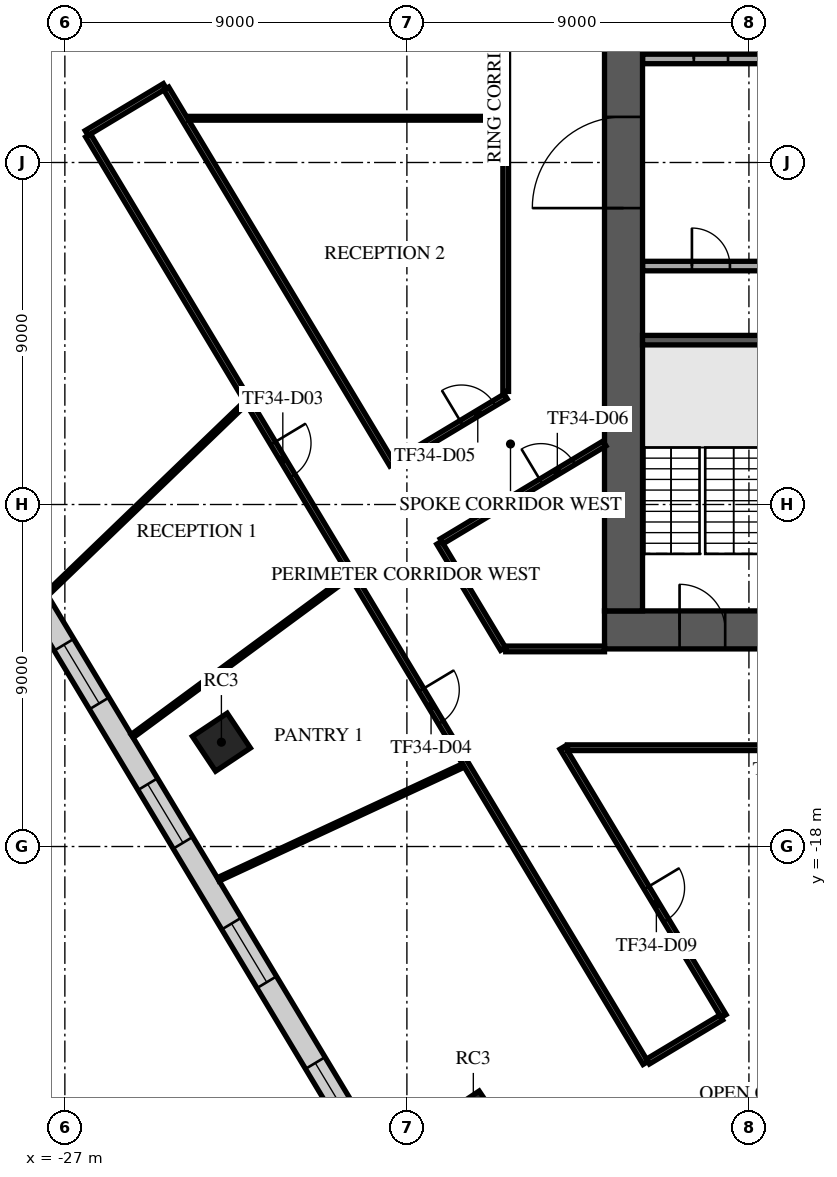
"""IFC4 building model, lengths in metres.
Left out: names, types, materials, properties, quantities, classifications, styles, units other than length and angle.
Written with IfcOpenShell. Run it as: python <this file> out.ifc"""

import sys

from ifc_helpers import new_model, si_unit, direction, frame, frame_2d, origin, origin_2d, place, context, subcontext, project, spatial, rectangle, extrude, element, fill, save


model = new_model("IFC4")
c1 = context("Model", 3, precision=1e-05, world=origin(), true_north=direction((0.0, 1.0)))
c2 = subcontext(c1, "Body", "Model", "MODEL_VIEW")
j1 = project(units=[si_unit("LENGTHUNIT", "METRE"), si_unit("PLANEANGLEUNIT", "RADIAN")], contexts=[c1])
p1 = place(None, origin())
s1 = spatial("IfcSite", under=j1, at=p1, CompositionType="ELEMENT")
p2 = place(p1, origin())
s2 = spatial("IfcBuilding", under=s1, at=p2, CompositionType="ELEMENT")
p3 = place(p2, frame((0.0, 0.0, 147.7)))
s3 = spatial("IfcBuildingStorey", under=s2, at=p3, CompositionType="ELEMENT", Elevation=147.7)
for number, where, z_axis, x_axis in (
    (1, (-22.881, -15.255, 0.0), (0.0, 0.0, 1.0), (0.832, 0.555, 0.0)),
    (2, (-16.252, -25.198, 0.0), (0.0, 0.0, 1.0), (0.832, 0.555, 0.0)),
):
    element("IfcColumn", number, at=place(p3, frame(where, z_axis=z_axis, x_axis=x_axis)), inside=s3, PredefinedType="COLUMN", context=c2, shape_type="SweptSolid", body=[
        extrude(rectangle(XDim=1.1, YDim=1.1, at=origin_2d()), origin(), (0.0, 0.0, 1.0), 4.0),
    ])
p4 = place(p3, frame((-12.8, -12.3, 0.0), z_axis=(0.0, 0.0, 1.0), x_axis=(1.0, 0.0, 0.0)))
e3 = element("IfcWall", 3, at=p4, inside=s3, PredefinedType="SHEAR", context=c2, shape_type="SweptSolid", body=[
    extrude(rectangle(XDim=25.6, YDim=1.0, at=frame_2d((12.8, 0.0))), origin(), (0.0, 0.0, 1.0), 3.6),
])
p5 = place(p4, frame((7.7, 0.0, 0.0)))
e4 = element("IfcOpeningElement", 4, at=p5, cuts=e3, PredefinedType="OPENING", context=c2, shape_type="SweptSolid", body=[
    extrude(rectangle(XDim=2.0, YDim=2.1, at=frame_2d((1.0, 1.05))), frame((0.0, 0.51, 0.0), z_axis=(0.0, -1.0, 0.0), x_axis=(1.0, 0.0, 0.0)), (0.0, 0.0, 1.0), 1.02),
])
p6 = place(p4, frame((17.825, 0.0, 0.0)))
e5 = element("IfcOpeningElement", 5, at=p6, cuts=e3, PredefinedType="OPENING", context=c2, shape_type="SweptSolid", body=[
    extrude(rectangle(XDim=1.2, YDim=2.1, at=frame_2d((0.6, 1.05))), frame((0.0, 0.51, 0.0), z_axis=(0.0, -1.0, 0.0), x_axis=(1.0, 0.0, 0.0)), (0.0, 0.0, 1.0), 1.02),
])
p7 = place(p4, frame((1.975, 0.0, 0.0)))
e6 = element("IfcOpeningElement", 6, at=p7, cuts=e3, PredefinedType="OPENING", context=c2, shape_type="SweptSolid", body=[
    extrude(rectangle(XDim=1.2, YDim=2.1, at=frame_2d((0.6, 1.05))), frame((0.0, 0.51, 0.0), z_axis=(0.0, -1.0, 0.0), x_axis=(1.0, 0.0, 0.0)), (0.0, 0.0, 1.0), 1.02),
])
p8 = place(p4, frame((22.425, 0.0, 0.0)))
e7 = element("IfcOpeningElement", 7, at=p8, cuts=e3, PredefinedType="OPENING", context=c2, shape_type="SweptSolid", body=[
    extrude(rectangle(XDim=1.2, YDim=2.1, at=frame_2d((0.6, 1.05))), frame((0.0, 0.51, 0.0), z_axis=(0.0, -1.0, 0.0), x_axis=(1.0, 0.0, 0.0)), (0.0, 0.0, 1.0), 1.02),
])
p9 = place(p3, frame((-12.3, -11.8, 0.0), z_axis=(0.0, 0.0, 1.0), x_axis=(0.0, 1.0, 0.0)))
e8 = element("IfcWall", 8, at=p9, inside=s3, PredefinedType="SHEAR", context=c2, shape_type="SweptSolid", body=[
    extrude(rectangle(XDim=23.6, YDim=1.0, at=frame_2d((11.8, 0.0))), origin(), (0.0, 0.0, 1.0), 3.6),
])
p10 = place(p9, frame((10.6, 0.0, 0.0)))
e9 = element("IfcOpeningElement", 9, at=p10, cuts=e8, PredefinedType="OPENING", context=c2, shape_type="SweptSolid", body=[
    extrude(rectangle(XDim=2.4, YDim=2.4, at=frame_2d((1.2, 1.2))), frame((0.0, 0.51, 0.0), z_axis=(0.0, -1.0, 0.0), x_axis=(1.0, 0.0, 0.0)), (0.0, 0.0, 1.0), 1.02),
])
p11 = place(p3, frame((-8.65, -4.675, 0.0), z_axis=(0.0, 0.0, 1.0), x_axis=(-1.0, 0.0, 0.0)))
e10 = element("IfcWall", 10, at=p11, inside=s3, PredefinedType="SOLIDWALL", context=c2, shape_type="SweptSolid", body=[
    extrude(rectangle(XDim=3.15, YDim=0.25, at=frame_2d((1.575, 0.0))), origin(), (0.0, 0.0, 1.0), 3.6),
])
p12 = place(p3, frame((-11.795, -2.725, 0.0), z_axis=(0.0, 0.0, 1.0), x_axis=(1.0, 0.0, 0.0)))
e11 = element("IfcWall", 11, at=p12, inside=s3, PredefinedType="PARTITIONING", context=c2, shape_type="SweptSolid", body=[
    extrude(rectangle(XDim=8.915, YDim=0.25, at=frame_2d((4.458, 0.0))), origin(), (0.0, 0.0, 1.0), 3.6),
])
p13 = place(p12, frame((1.295, 0.0, 0.0)))
e12 = element("IfcOpeningElement", 12, at=p13, cuts=e11, PredefinedType="OPENING", context=c2, shape_type="SweptSolid", body=[
    extrude(rectangle(XDim=1.0, YDim=2.1, at=frame_2d((0.5, 1.05))), frame((0.0, 0.135, 0.0), z_axis=(0.0, -1.0, 0.0), x_axis=(1.0, 0.0, 0.0)), (0.0, 0.0, 1.0), 0.27),
])
p14 = place(p12, frame((4.42, 0.0, 0.0)))
e13 = element("IfcOpeningElement", 13, at=p14, cuts=e11, PredefinedType="OPENING", context=c2, shape_type="SweptSolid", body=[
    extrude(rectangle(XDim=1.0, YDim=2.1, at=frame_2d((0.5, 1.05))), frame((0.0, 0.135, 0.0), z_axis=(0.0, -1.0, 0.0), x_axis=(1.0, 0.0, 0.0)), (0.0, 0.0, 1.0), 0.27),
])
p15 = place(p3, frame((-11.795, 2.725, 0.0), z_axis=(0.0, 0.0, 1.0), x_axis=(1.0, 0.0, 0.0)))
e14 = element("IfcWall", 14, at=p15, inside=s3, PredefinedType="PARTITIONING", context=c2, shape_type="SweptSolid", body=[
    extrude(rectangle(XDim=3.415, YDim=0.25, at=frame_2d((1.708, 0.0))), origin(), (0.0, 0.0, 1.0), 3.6),
])
p16 = place(p15, frame((1.345, 0.0, 0.0)))
e15 = element("IfcOpeningElement", 15, at=p16, cuts=e14, PredefinedType="OPENING", context=c2, shape_type="SweptSolid", body=[
    extrude(rectangle(XDim=0.9, YDim=2.1, at=frame_2d((0.45, 1.05))), frame((0.0, 0.135, 0.0), z_axis=(0.0, -1.0, 0.0), x_axis=(1.0, 0.0, 0.0)), (0.0, 0.0, 1.0), 0.27),
])
p17 = place(p3, frame((-36.416, 2.94, 0.0), z_axis=(0.0, 0.0, 1.0), x_axis=(0.515041561016, -0.857165206029, 0.0)))
e16 = element("IfcWall", 16, at=p17, inside=s3, PredefinedType="STANDARD", context=c2, shape_type="SweptSolid", body=[
    extrude(rectangle(XDim=42.552, YDim=0.6, at=frame_2d((21.276, 0.0))), origin(), (0.0, 0.0, 1.0), 3.6),
])
p18 = place(p17, frame((1.178, 0.0, 0.9)))
e17 = element("IfcOpeningElement", 17, at=p18, cuts=e16, PredefinedType="OPENING", context=c2, shape_type="SweptSolid", body=[
    extrude(rectangle(XDim=1.8, YDim=2.1, at=frame_2d((0.9, 1.05))), frame((0.0, 0.31, 0.0), z_axis=(0.0, -1.0, 0.0), x_axis=(1.0, 0.0, 0.0)), (0.0, 0.0, 1.0), 0.62),
])
p19 = place(p17, frame((5.396, 0.0, 0.9)))
e18 = element("IfcOpeningElement", 18, at=p19, cuts=e16, PredefinedType="OPENING", context=c2, shape_type="SweptSolid", body=[
    extrude(rectangle(XDim=1.8, YDim=2.1, at=frame_2d((0.9, 1.05))), frame((0.0, 0.31, 0.0), z_axis=(0.0, -1.0, 0.0), x_axis=(1.0, 0.0, 0.0)), (0.0, 0.0, 1.0), 0.62),
])
p20 = place(p17, frame((9.676, 0.0, 0.9)))
e19 = element("IfcOpeningElement", 19, at=p20, cuts=e16, PredefinedType="OPENING", context=c2, shape_type="SweptSolid", body=[
    extrude(rectangle(XDim=1.8, YDim=2.1, at=frame_2d((0.9, 1.05))), frame((0.0, 0.31, 0.0), z_axis=(0.0, -1.0, 0.0), x_axis=(1.0, 0.0, 0.0)), (0.0, 0.0, 1.0), 0.62),
])
p21 = place(p17, frame((13.956, 0.0, 0.9)))
e20 = element("IfcOpeningElement", 20, at=p21, cuts=e16, PredefinedType="OPENING", context=c2, shape_type="SweptSolid", body=[
    extrude(rectangle(XDim=1.8, YDim=2.1, at=frame_2d((0.9, 1.05))), frame((0.0, 0.31, 0.0), z_axis=(0.0, -1.0, 0.0), x_axis=(1.0, 0.0, 0.0)), (0.0, 0.0, 1.0), 0.62),
])
p22 = place(p17, frame((18.236, 0.0, 0.9)))
e21 = element("IfcOpeningElement", 21, at=p22, cuts=e16, PredefinedType="OPENING", context=c2, shape_type="SweptSolid", body=[
    extrude(rectangle(XDim=1.8, YDim=2.1, at=frame_2d((0.9, 1.05))), frame((0.0, 0.31, 0.0), z_axis=(0.0, -1.0, 0.0), x_axis=(1.0, 0.0, 0.0)), (0.0, 0.0, 1.0), 0.62),
])
p23 = place(p17, frame((22.516, 0.0, 0.9)))
e22 = element("IfcOpeningElement", 22, at=p23, cuts=e16, PredefinedType="OPENING", context=c2, shape_type="SweptSolid", body=[
    extrude(rectangle(XDim=1.8, YDim=2.1, at=frame_2d((0.9, 1.05))), frame((0.0, 0.31, 0.0), z_axis=(0.0, -1.0, 0.0), x_axis=(1.0, 0.0, 0.0)), (0.0, 0.0, 1.0), 0.62),
])
p24 = place(p17, frame((26.796, 0.0, 0.9)))
e23 = element("IfcOpeningElement", 23, at=p24, cuts=e16, PredefinedType="OPENING", context=c2, shape_type="SweptSolid", body=[
    extrude(rectangle(XDim=1.8, YDim=2.1, at=frame_2d((0.9, 1.05))), frame((0.0, 0.31, 0.0), z_axis=(0.0, -1.0, 0.0), x_axis=(1.0, 0.0, 0.0)), (0.0, 0.0, 1.0), 0.62),
])
p25 = place(p17, frame((31.076, 0.0, 0.9)))
e24 = element("IfcOpeningElement", 24, at=p25, cuts=e16, PredefinedType="OPENING", context=c2, shape_type="SweptSolid", body=[
    extrude(rectangle(XDim=1.8, YDim=2.1, at=frame_2d((0.9, 1.05))), frame((0.0, 0.31, 0.0), z_axis=(0.0, -1.0, 0.0), x_axis=(1.0, 0.0, 0.0)), (0.0, 0.0, 1.0), 0.62),
])
p26 = place(p17, frame((35.356, 0.0, 0.9)))
e25 = element("IfcOpeningElement", 25, at=p26, cuts=e16, PredefinedType="OPENING", context=c2, shape_type="SweptSolid", body=[
    extrude(rectangle(XDim=1.8, YDim=2.1, at=frame_2d((0.9, 1.05))), frame((0.0, 0.31, 0.0), z_axis=(0.0, -1.0, 0.0), x_axis=(1.0, 0.0, 0.0)), (0.0, 0.0, 1.0), 0.62),
])
p27 = place(p17, frame((39.573, 0.0, 0.9)))
e26 = element("IfcOpeningElement", 26, at=p27, cuts=e16, PredefinedType="OPENING", context=c2, shape_type="SweptSolid", body=[
    extrude(rectangle(XDim=1.8, YDim=2.1, at=frame_2d((0.9, 1.05))), frame((0.0, 0.31, 0.0), z_axis=(0.0, -1.0, 0.0), x_axis=(1.0, 0.0, 0.0)), (0.0, 0.0, 1.0), 0.62),
])
p28 = place(p3, frame((-26.427, 0.775, 0.0), z_axis=(0.0, 0.0, 1.0), x_axis=(0.857133645358, 0.515094082664, 0.0)))
e27 = element("IfcWall", 27, at=p28, inside=s3, PredefinedType="PARTITIONING", context=c2, shape_type="SweptSolid", body=[
    extrude(rectangle(XDim=2.4, YDim=0.15, at=frame_2d((1.2, 0.0))), origin(), (0.0, 0.0, 1.0), 3.6),
])
p29 = place(p3, frame((-26.388, 0.711, 0.0), z_axis=(0.0, 0.0, 1.0), x_axis=(0.515060503771, -0.857153823684, 0.0)))
e28 = element("IfcWall", 28, at=p29, inside=s3, PredefinedType="PARTITIONING", context=c2, shape_type="SweptSolid", body=[
    extrude(rectangle(XDim=28.475, YDim=0.15, at=frame_2d((14.238, 0.0))), origin(), (0.0, 0.0, 1.0), 3.15),
])
p30 = place(p29, frame((9.447, 0.0, 0.0)))
e29 = element("IfcOpeningElement", 29, at=p30, cuts=e28, PredefinedType="OPENING", context=c2, shape_type="SweptSolid", body=[
    extrude(rectangle(XDim=1.0, YDim=2.1, at=frame_2d((0.5, 1.05))), frame((0.0, 0.085, 0.0), z_axis=(0.0, -1.0, 0.0), x_axis=(1.0, 0.0, 0.0)), (0.0, 0.0, 1.0), 0.17),
])
p31 = place(p29, frame((17.021, 0.0, 0.0)))
e30 = element("IfcOpeningElement", 30, at=p31, cuts=e28, PredefinedType="OPENING", context=c2, shape_type="SweptSolid", body=[
    extrude(rectangle(XDim=1.0, YDim=2.1, at=frame_2d((0.5, 1.05))), frame((0.0, 0.085, 0.0), z_axis=(0.0, -1.0, 0.0), x_axis=(1.0, 0.0, 0.0)), (0.0, 0.0, 1.0), 0.17),
])
p32 = place(p3, frame((-24.331, 1.947, 0.0), z_axis=(0.0, 0.0, 1.0), x_axis=(0.51502118809, -0.857177447101, 0.0)))
e31 = element("IfcWall", 31, at=p32, inside=s3, PredefinedType="PARTITIONING", context=c2, shape_type="SweptSolid", body=[
    extrude(rectangle(XDim=11.546, YDim=0.15, at=frame_2d((5.773, 0.0))), origin(), (0.0, 0.0, 1.0), 3.15),
])
p33 = place(p3, frame((-18.321, -7.911, 0.0), z_axis=(0.0, 0.0, 1.0), x_axis=(0.857126069009, 0.51510668975, 0.0)))
e32 = element("IfcWall", 32, at=p33, inside=s3, PredefinedType="PARTITIONING", context=c2, shape_type="SweptSolid", body=[
    extrude(rectangle(XDim=3.408, YDim=0.15, at=frame_2d((1.704, 0.0))), origin(), (0.0, 0.0, 1.0), 3.6),
])
p34 = place(p33, frame((2.05, 0.0, 0.0)))
e33 = element("IfcOpeningElement", 33, at=p34, cuts=e32, PredefinedType="OPENING", context=c2, shape_type="SweptSolid", body=[
    extrude(rectangle(XDim=1.0, YDim=2.1, at=frame_2d((0.5, 1.05))), frame((0.0, 0.085, 0.0), z_axis=(0.0, -1.0, 0.0), x_axis=(1.0, 0.0, 0.0)), (0.0, 0.0, 1.0), 0.17),
])
p35 = place(p3, frame((-17.149, -10.007, 0.0), z_axis=(0.0, 0.0, 1.0), x_axis=(0.515211704808, -0.857062949397, 0.0)))
e34 = element("IfcWall", 34, at=p35, inside=s3, PredefinedType="PARTITIONING", context=c2, shape_type="SweptSolid", body=[
    extrude(rectangle(XDim=3.259, YDim=0.15, at=frame_2d((1.629, 0.0))), origin(), (0.0, 0.0, 1.0), 3.15),
])
p36 = place(p3, frame((-17.085, -9.969, 0.0), z_axis=(0.0, 0.0, 1.0), x_axis=(0.857169540237, 0.515034347681, 0.0)))
e35 = element("IfcWall", 35, at=p36, inside=s3, PredefinedType="PARTITIONING", context=c2, shape_type="SweptSolid", body=[
    extrude(rectangle(XDim=4.999, YDim=0.15, at=frame_2d((2.499, 0.0))), origin(), (0.0, 0.0, 1.0), 3.15),
])
p37 = place(p36, frame((3.05, 0.0, 0.0)))
e36 = element("IfcOpeningElement", 36, at=p37, cuts=e35, PredefinedType="OPENING", context=c2, shape_type="SweptSolid", body=[
    extrude(rectangle(XDim=1.0, YDim=2.1, at=frame_2d((0.5, 1.05))), frame((0.0, 0.085, 0.0), z_axis=(0.0, -1.0, 0.0), x_axis=(1.0, 0.0, 0.0)), (0.0, 0.0, 1.0), 0.17),
])
p38 = place(p3, frame((-15.4, -12.8, 0.0), z_axis=(0.0, 0.0, 1.0), x_axis=(1.0, 0.0, 0.0)))
e37 = element("IfcWall", 37, at=p38, inside=s3, PredefinedType="PARTITIONING", context=c2, shape_type="SweptSolid", body=[
    extrude(rectangle(XDim=2.6, YDim=0.15, at=frame_2d((1.3, 0.0))), origin(), (0.0, 0.0, 1.0), 3.03),
])
p39 = place(p3, frame((-15.4, -6.023, 0.0), z_axis=(0.0, 0.0, 1.0), x_axis=(0.0, 1.0, 0.0)))
e38 = element("IfcWall", 38, at=p39, inside=s3, PredefinedType="PARTITIONING", context=c2, shape_type="SweptSolid", body=[
    extrude(rectangle(XDim=16.023, YDim=0.15, at=frame_2d((8.012, 0.0))), origin(), (0.0, 0.0, 1.0), 3.15),
])
p40 = place(p3, frame((-13.908, -15.4, 0.0), z_axis=(0.0, 0.0, 1.0), x_axis=(0.515057872285, -0.857155404928, 0.0)))
e39 = element("IfcWall", 39, at=p40, inside=s3, PredefinedType="PARTITIONING", context=c2, shape_type="SweptSolid", body=[
    extrude(rectangle(XDim=8.238, YDim=0.15, at=frame_2d((4.119, 0.0))), origin(), (0.0, 0.0, 1.0), 3.15),
])
p41 = place(p40, frame((4.3, 0.0, 0.0)))
e40 = element("IfcOpeningElement", 40, at=p41, cuts=e39, PredefinedType="OPENING", context=c2, shape_type="SweptSolid", body=[
    extrude(rectangle(XDim=1.0, YDim=2.1, at=frame_2d((0.5, 1.05))), frame((0.0, 0.085, 0.0), z_axis=(0.0, -1.0, 0.0), x_axis=(1.0, 0.0, 0.0)), (0.0, 0.0, 1.0), 0.17),
])
p42 = place(p3, frame((-13.775, -15.4, 0.0), z_axis=(0.0, 0.0, 1.0), x_axis=(1.0, 0.0, 0.0)))
e41 = element("IfcWall", 41, at=p42, inside=s3, PredefinedType="PARTITIONING", context=c2, shape_type="SweptSolid", body=[
    extrude(rectangle(XDim=19.917, YDim=0.15, at=frame_2d((9.958, 0.0))), origin(), (0.0, 0.0, 1.0), 3.15),
])
p43 = place(p42, frame((5.05, 0.0, 0.0)))
e42 = element("IfcOpeningElement", 42, at=p43, cuts=e41, PredefinedType="OPENING", context=c2, shape_type="SweptSolid", body=[
    extrude(rectangle(XDim=1.8, YDim=2.1, at=frame_2d((0.9, 1.05))), frame((0.0, 0.085, 0.0), z_axis=(0.0, -1.0, 0.0), x_axis=(1.0, 0.0, 0.0)), (0.0, 0.0, 1.0), 0.17),
])
p44 = place(p42, frame((13.11, 0.0, 0.0)))
e43 = element("IfcOpeningElement", 43, at=p44, cuts=e41, PredefinedType="OPENING", context=c2, shape_type="SweptSolid", body=[
    extrude(rectangle(XDim=1.0, YDim=2.1, at=frame_2d((0.5, 1.05))), frame((0.0, 0.085, 0.0), z_axis=(0.0, -1.0, 0.0), x_axis=(1.0, 0.0, 0.0)), (0.0, 0.0, 1.0), 0.17),
])
p45 = place(p3, frame((-11.658, -23.658, 0.0), z_axis=(0.0, 0.0, 1.0), x_axis=(0.857128880098, 0.515102012131, 0.0)))
e44 = element("IfcWall", 44, at=p45, inside=s3, PredefinedType="PARTITIONING", context=c2, shape_type="SweptSolid", body=[
    extrude(rectangle(XDim=2.25, YDim=0.15, at=frame_2d((1.125, 0.0))), origin(), (0.0, 0.0, 1.0), 3.15),
])
p46 = place(p3, frame((-27.473, -11.357, 0.0), z_axis=(0.0, 0.0, 1.0), x_axis=(0.720430003107, 0.693527656711, 0.0)))
e45 = element("IfcWall", 45, at=p46, inside=s3, PredefinedType="PARTITIONING", context=c2, shape_type="SweptSolid", body=[
    extrude(rectangle(XDim=7.242, YDim=0.1, at=frame_2d((3.621, 0.0))), origin(), (0.0, 0.0, 1.0), 2.9),
])
p47 = place(p3, frame((-25.228, -15.094, 0.0), z_axis=(0.0, 0.0, 1.0), x_axis=(0.805036814034, 0.593224854545, 0.0)))
e46 = element("IfcWall", 46, at=p47, inside=s3, PredefinedType="PARTITIONING", context=c2, shape_type="SweptSolid", body=[
    extrude(rectangle(XDim=7.097, YDim=0.1, at=frame_2d((3.548, 0.0))), origin(), (0.0, 0.0, 1.0), 2.9),
])
p48 = place(p3, frame((-23.743, 1.164, 0.0), z_axis=(0.0, 0.0, 1.0), x_axis=(1.0, 0.0, 0.0)))
e47 = element("IfcWall", 47, at=p48, inside=s3, PredefinedType="PARTITIONING", context=c2, shape_type="SweptSolid", body=[
    extrude(rectangle(XDim=8.268, YDim=0.1, at=frame_2d((4.134, 0.0))), origin(), (0.0, 0.0, 1.0), 3.6),
])
p49 = place(p3, frame((-22.962, -18.864, 0.0), z_axis=(0.0, 0.0, 1.0), x_axis=(0.906871101806, 0.421408121313, 0.0)))
e48 = element("IfcWall", 48, at=p49, inside=s3, PredefinedType="PARTITIONING", context=c2, shape_type="SweptSolid", body=[
    extrude(rectangle(XDim=7.104, YDim=0.1, at=frame_2d((3.552, 0.0))), origin(), (0.0, 0.0, 1.0), 2.9),
])
p50 = place(p7, origin())
e49 = element("IfcDoor", 49, at=p50, inside=s3, OperationType="SINGLE_SWING_LEFT", PredefinedType="DOOR", context=c2, shape_type="SweptSolid", body=[
    extrude(rectangle(XDim=1.2, YDim=2.1, at=frame_2d((0.6, 1.05))), frame((0.0, 0.025, 0.0), z_axis=(0.0, -1.0, 0.0), x_axis=(1.0, 0.0, 0.0)), (0.0, 0.0, 1.0), 0.05),
])
fill(e6, e49)
p51 = place(p10, origin())
e50 = element("IfcDoor", 50, at=p51, inside=s3, OperationType="SINGLE_SWING_LEFT", PredefinedType="DOOR", context=c2, shape_type="SweptSolid", body=[
    extrude(rectangle(XDim=2.4, YDim=2.4, at=frame_2d((1.2, 1.2))), frame((0.0, 0.025, 0.0), z_axis=(0.0, -1.0, 0.0), x_axis=(1.0, 0.0, 0.0)), (0.0, 0.0, 1.0), 0.05),
])
fill(e9, e50)
p52 = place(p13, origin())
e51 = element("IfcDoor", 51, at=p52, inside=s3, OperationType="SINGLE_SWING_LEFT", PredefinedType="DOOR", context=c2, shape_type="SweptSolid", body=[
    extrude(rectangle(XDim=1.0, YDim=2.1, at=frame_2d((0.5, 1.05))), frame((0.0, 0.025, 0.0), z_axis=(0.0, -1.0, 0.0), x_axis=(1.0, 0.0, 0.0)), (0.0, 0.0, 1.0), 0.05),
])
fill(e12, e51)
p53 = place(p16, origin())
e52 = element("IfcDoor", 52, at=p53, inside=s3, OperationType="SINGLE_SWING_LEFT", PredefinedType="DOOR", context=c2, shape_type="SweptSolid", body=[
    extrude(rectangle(XDim=0.9, YDim=2.1, at=frame_2d((0.45, 1.05))), frame((0.0, 0.025, 0.0), z_axis=(0.0, -1.0, 0.0), x_axis=(1.0, 0.0, 0.0)), (0.0, 0.0, 1.0), 0.05),
])
fill(e15, e52)
p54 = place(p22, origin())
e53 = element("IfcWindow", 53, at=p54, inside=s3, PartitioningType="SINGLE_PANEL", PredefinedType="WINDOW", context=c2, shape_type="SweptSolid", body=[
    extrude(rectangle(XDim=1.8, YDim=2.1, at=frame_2d((0.9, 1.05))), frame((0.0, 0.03, 0.0), z_axis=(0.0, -1.0, 0.0), x_axis=(1.0, 0.0, 0.0)), (0.0, 0.0, 1.0), 0.06),
])
fill(e21, e53)
p55 = place(p23, origin())
e54 = element("IfcWindow", 54, at=p55, inside=s3, PartitioningType="SINGLE_PANEL", PredefinedType="WINDOW", context=c2, shape_type="SweptSolid", body=[
    extrude(rectangle(XDim=1.8, YDim=2.1, at=frame_2d((0.9, 1.05))), frame((0.0, 0.03, 0.0), z_axis=(0.0, -1.0, 0.0), x_axis=(1.0, 0.0, 0.0)), (0.0, 0.0, 1.0), 0.06),
])
fill(e22, e54)
p56 = place(p24, origin())
e55 = element("IfcWindow", 55, at=p56, inside=s3, PartitioningType="SINGLE_PANEL", PredefinedType="WINDOW", context=c2, shape_type="SweptSolid", body=[
    extrude(rectangle(XDim=1.8, YDim=2.1, at=frame_2d((0.9, 1.05))), frame((0.0, 0.03, 0.0), z_axis=(0.0, -1.0, 0.0), x_axis=(1.0, 0.0, 0.0)), (0.0, 0.0, 1.0), 0.06),
])
fill(e23, e55)
p57 = place(p25, origin())
e56 = element("IfcWindow", 56, at=p57, inside=s3, PartitioningType="SINGLE_PANEL", PredefinedType="WINDOW", context=c2, shape_type="SweptSolid", body=[
    extrude(rectangle(XDim=1.8, YDim=2.1, at=frame_2d((0.9, 1.05))), frame((0.0, 0.03, 0.0), z_axis=(0.0, -1.0, 0.0), x_axis=(1.0, 0.0, 0.0)), (0.0, 0.0, 1.0), 0.06),
])
fill(e24, e56)
p58 = place(p30, frame((1.0, 0.0, 0.0), z_axis=(0.0, 0.0, 1.0), x_axis=(-1.0, 0.0, 0.0)))
e57 = element("IfcDoor", 57, at=p58, inside=s3, OperationType="SINGLE_SWING_RIGHT", PredefinedType="DOOR", context=c2, shape_type="SweptSolid", body=[
    extrude(rectangle(XDim=1.0, YDim=2.1, at=frame_2d((0.5, 1.05))), frame((0.0, 0.025, 0.0), z_axis=(0.0, -1.0, 0.0), x_axis=(1.0, 0.0, 0.0)), (0.0, 0.0, 1.0), 0.05),
])
fill(e29, e57)
p59 = place(p31, frame((1.0, 0.0, 0.0), z_axis=(0.0, 0.0, 1.0), x_axis=(-1.0, 0.0, 0.0)))
e58 = element("IfcDoor", 58, at=p59, inside=s3, OperationType="SINGLE_SWING_LEFT", PredefinedType="DOOR", context=c2, shape_type="SweptSolid", body=[
    extrude(rectangle(XDim=1.0, YDim=2.1, at=frame_2d((0.5, 1.05))), frame((0.0, 0.025, 0.0), z_axis=(0.0, -1.0, 0.0), x_axis=(1.0, 0.0, 0.0)), (0.0, 0.0, 1.0), 0.05),
])
fill(e30, e58)
p60 = place(p34, origin())
e59 = element("IfcDoor", 59, at=p60, inside=s3, OperationType="SINGLE_SWING_LEFT", PredefinedType="DOOR", context=c2, shape_type="SweptSolid", body=[
    extrude(rectangle(XDim=1.0, YDim=2.1, at=frame_2d((0.5, 1.05))), frame((0.0, 0.025, 0.0), z_axis=(0.0, -1.0, 0.0), x_axis=(1.0, 0.0, 0.0)), (0.0, 0.0, 1.0), 0.05),
])
fill(e33, e59)
p61 = place(p37, frame((1.0, 0.0, 0.0), z_axis=(0.0, 0.0, 1.0), x_axis=(-1.0, 0.0, 0.0)))
e60 = element("IfcDoor", 60, at=p61, inside=s3, OperationType="SINGLE_SWING_RIGHT", PredefinedType="DOOR", context=c2, shape_type="SweptSolid", body=[
    extrude(rectangle(XDim=1.0, YDim=2.1, at=frame_2d((0.5, 1.05))), frame((0.0, 0.025, 0.0), z_axis=(0.0, -1.0, 0.0), x_axis=(1.0, 0.0, 0.0)), (0.0, 0.0, 1.0), 0.05),
])
fill(e36, e60)
p62 = place(p41, origin())
e61 = element("IfcDoor", 61, at=p62, inside=s3, OperationType="SINGLE_SWING_LEFT", PredefinedType="DOOR", context=c2, shape_type="SweptSolid", body=[
    extrude(rectangle(XDim=1.0, YDim=2.1, at=frame_2d((0.5, 1.05))), frame((0.0, 0.025, 0.0), z_axis=(0.0, -1.0, 0.0), x_axis=(1.0, 0.0, 0.0)), (0.0, 0.0, 1.0), 0.05),
])
fill(e40, e61)
save(model, sys.argv[1])
